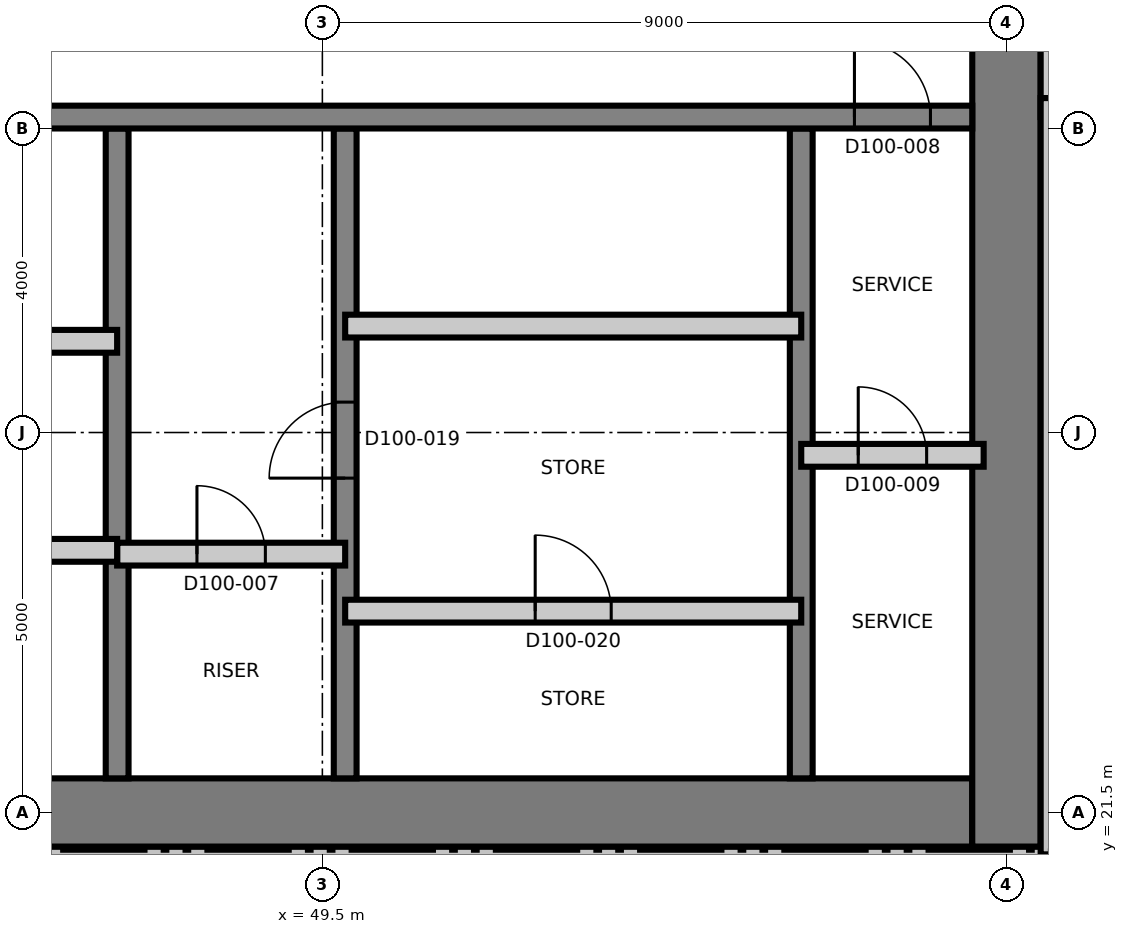
"""IFC4 building model, lengths in metres.
Left out: names, types, materials, properties, quantities, classifications, styles, units other than length and angle.
Written with IfcOpenShell. Run it as: python <this file> out.ifc"""

import sys

from ifc_helpers import new_model, si_unit, direction, frame, frame_2d, origin, place, context, subcontext, project, spatial, rectangle, extrude, element, fill, save


model = new_model("IFC4")
c1 = context("Model", 3, precision=1e-05, world=origin(), true_north=direction((0.0, 1.0)))
c2 = subcontext(c1, "Body", "Model", "MODEL_VIEW")
j1 = project(units=[si_unit("LENGTHUNIT", "METRE"), si_unit("PLANEANGLEUNIT", "RADIAN")], contexts=[c1])
p1 = place(None, origin())
s1 = spatial("IfcSite", under=j1, at=p1, CompositionType="ELEMENT")
p2 = place(p1, origin())
s2 = spatial("IfcBuilding", under=s1, at=p2, CompositionType="ELEMENT")
p3 = place(p2, frame((0.0, 0.0, -9.0)))
s3 = spatial("IfcBuildingStorey", under=s2, at=p3, CompositionType="ELEMENT", Elevation=-9.0)
p4 = place(p3, frame((31.05, 21.5, 0.0), z_axis=(0.0, 0.0, 1.0), x_axis=(1.0, 0.0, 0.0)))
e1 = element("IfcWall", 1, at=p4, inside=s3, PredefinedType="SHEAR", context=c2, shape_type="SweptSolid", body=[
    extrude(rectangle(XDim=27.0, YDim=0.9, at=frame_2d((13.5, 0.0))), origin(), (0.0, 0.0, 1.0), 4.5),
])
p5 = place(p3, frame((58.5, 21.05, 0.0), z_axis=(0.0, 0.0, 1.0), x_axis=(0.0, 1.0, 0.0)))
e2 = element("IfcWall", 2, at=p5, inside=s3, PredefinedType="SHEAR", context=c2, shape_type="SweptSolid", body=[
    extrude(rectangle(XDim=18.9, YDim=0.9, at=frame_2d((9.45, 0.0))), origin(), (0.0, 0.0, 1.0), 4.5),
])
p6 = place(p3, frame((46.8, 21.95, 0.0), z_axis=(0.0, 0.0, 1.0), x_axis=(0.0, 1.0, 0.0)))
e3 = element("IfcWall", 3, at=p6, inside=s3, PredefinedType="SHEAR", context=c2, shape_type="SweptSolid", body=[
    extrude(rectangle(XDim=8.55, YDim=0.3, at=frame_2d((4.275, 0.0))), origin(), (0.0, 0.0, 1.0), 4.5),
])
p7 = place(p3, frame((49.8, 21.95, 0.0), z_axis=(0.0, 0.0, 1.0), x_axis=(0.0, 1.0, 0.0)))
e4 = element("IfcWall", 4, at=p7, inside=s3, PredefinedType="SHEAR", context=c2, shape_type="SweptSolid", body=[
    extrude(rectangle(XDim=8.55, YDim=0.3, at=frame_2d((4.275, 0.0))), origin(), (0.0, 0.0, 1.0), 4.5),
])
p8 = place(p7, frame((3.95, 0.0, 0.0)))
e5 = element("IfcOpeningElement", 5, at=p8, cuts=e4, PredefinedType="OPENING", context=c2, shape_type="SweptSolid", body=[
    extrude(rectangle(XDim=1.0, YDim=2.1, at=frame_2d((0.5, 1.05))), frame((0.0, 0.16, 0.0), z_axis=(0.0, -1.0, 0.0), x_axis=(1.0, 0.0, 0.0)), (0.0, 0.0, 1.0), 0.32),
])
p9 = place(p3, frame((55.8, 21.95, 0.0), z_axis=(0.0, 0.0, 1.0), x_axis=(0.0, 1.0, 0.0)))
e6 = element("IfcWall", 6, at=p9, inside=s3, PredefinedType="SHEAR", context=c2, shape_type="SweptSolid", body=[
    extrude(rectangle(XDim=8.55, YDim=0.3, at=frame_2d((4.275, 0.0))), origin(), (0.0, 0.0, 1.0), 4.5),
])
p10 = place(p3, frame((31.95, 30.65, 0.0), z_axis=(0.0, 0.0, 1.0), x_axis=(1.0, 0.0, 0.0)))
e7 = element("IfcWall", 7, at=p10, inside=s3, PredefinedType="SHEAR", context=c2, shape_type="SweptSolid", body=[
    extrude(rectangle(XDim=26.1, YDim=0.3, at=frame_2d((13.05, 0.0))), origin(), (0.0, 0.0, 1.0), 4.5),
])
p11 = place(p10, frame((24.55, 0.0, 0.0)))
e8 = element("IfcOpeningElement", 8, at=p11, cuts=e7, PredefinedType="OPENING", context=c2, shape_type="SweptSolid", body=[
    extrude(rectangle(XDim=1.0, YDim=2.1, at=frame_2d((0.5, 1.05))), frame((0.0, 0.16, 0.0), z_axis=(0.0, -1.0, 0.0), x_axis=(1.0, 0.0, 0.0)), (0.0, 0.0, 1.0), 0.32),
])
p12 = place(p10, frame((3.85, 0.0, 0.0)))
e9 = element("IfcOpeningElement", 9, at=p12, cuts=e7, PredefinedType="OPENING", context=c2, shape_type="SweptSolid", body=[
    extrude(rectangle(XDim=1.0, YDim=2.1, at=frame_2d((0.5, 1.05))), frame((0.0, 0.16, 0.0), z_axis=(0.0, -1.0, 0.0), x_axis=(1.0, 0.0, 0.0)), (0.0, 0.0, 1.0), 0.32),
])
p13 = place(p10, frame((11.35, 0.0, 0.0)))
e10 = element("IfcOpeningElement", 10, at=p13, cuts=e7, PredefinedType="OPENING", context=c2, shape_type="SweptSolid", body=[
    extrude(rectangle(XDim=1.0, YDim=2.1, at=frame_2d((0.5, 1.05))), frame((0.0, 0.16, 0.0), z_axis=(0.0, -1.0, 0.0), x_axis=(1.0, 0.0, 0.0)), (0.0, 0.0, 1.0), 0.32),
])
p14 = place(p3, frame((49.8, 24.15, 0.0), z_axis=(0.0, 0.0, 1.0), x_axis=(1.0, 0.0, 0.0)))
e11 = element("IfcWall", 11, at=p14, inside=s3, PredefinedType="PARTITIONING", context=c2, shape_type="SweptSolid", body=[
    extrude(rectangle(XDim=6.0, YDim=0.3, at=frame_2d((3.0, 0.0))), origin(), (0.0, 0.0, 1.0), 4.2),
])
p15 = place(p14, frame((2.5, 0.0, 0.0)))
e12 = element("IfcOpeningElement", 12, at=p15, cuts=e11, PredefinedType="OPENING", context=c2, shape_type="SweptSolid", body=[
    extrude(rectangle(XDim=1.0, YDim=2.1, at=frame_2d((0.5, 1.05))), frame((0.0, 0.16, 0.0), z_axis=(0.0, -1.0, 0.0), x_axis=(1.0, 0.0, 0.0)), (0.0, 0.0, 1.0), 0.32),
])
p16 = place(p3, frame((46.8, 24.9, 0.0), z_axis=(0.0, 0.0, 1.0), x_axis=(1.0, 0.0, 0.0)))
e13 = element("IfcWall", 13, at=p16, inside=s3, PredefinedType="PARTITIONING", context=c2, shape_type="SweptSolid", body=[
    extrude(rectangle(XDim=3.0, YDim=0.3, at=frame_2d((1.5, 0.0))), origin(), (0.0, 0.0, 1.0), 4.2),
])
p17 = place(p16, frame((1.05, 0.0, 0.0)))
e14 = element("IfcOpeningElement", 14, at=p17, cuts=e13, PredefinedType="OPENING", context=c2, shape_type="SweptSolid", body=[
    extrude(rectangle(XDim=0.9, YDim=2.1, at=frame_2d((0.45, 1.05))), frame((0.0, 0.16, 0.0), z_axis=(0.0, -1.0, 0.0), x_axis=(1.0, 0.0, 0.0)), (0.0, 0.0, 1.0), 0.32),
])
p18 = place(p3, frame((40.8, 24.95, 0.0), z_axis=(0.0, 0.0, 1.0), x_axis=(1.0, 0.0, 0.0)))
e15 = element("IfcWall", 15, at=p18, inside=s3, PredefinedType="PARTITIONING", context=c2, shape_type="SweptSolid", body=[
    extrude(rectangle(XDim=6.0, YDim=0.3, at=frame_2d((3.0, 0.0))), origin(), (0.0, 0.0, 1.0), 4.2),
])
p19 = place(p18, frame((2.5, 0.0, 0.0)))
e16 = element("IfcOpeningElement", 16, at=p19, cuts=e15, PredefinedType="OPENING", context=c2, shape_type="SweptSolid", body=[
    extrude(rectangle(XDim=1.0, YDim=2.1, at=frame_2d((0.5, 1.05))), frame((0.0, 0.16, 0.0), z_axis=(0.0, -1.0, 0.0), x_axis=(1.0, 0.0, 0.0)), (0.0, 0.0, 1.0), 0.32),
])
p20 = place(p3, frame((55.8, 26.2, 0.0), z_axis=(0.0, 0.0, 1.0), x_axis=(1.0, 0.0, 0.0)))
e17 = element("IfcWall", 17, at=p20, inside=s3, PredefinedType="PARTITIONING", context=c2, shape_type="SweptSolid", body=[
    extrude(rectangle(XDim=2.4, YDim=0.3, at=frame_2d((1.2, 0.0))), origin(), (0.0, 0.0, 1.0), 4.2),
])
p21 = place(p20, frame((0.75, 0.0, 0.0)))
e18 = element("IfcOpeningElement", 18, at=p21, cuts=e17, PredefinedType="OPENING", context=c2, shape_type="SweptSolid", body=[
    extrude(rectangle(XDim=0.9, YDim=2.1, at=frame_2d((0.45, 1.05))), frame((0.0, 0.16, 0.0), z_axis=(0.0, -1.0, 0.0), x_axis=(1.0, 0.0, 0.0)), (0.0, 0.0, 1.0), 0.32),
])
for number, where, z_axis, x_axis in (
    (19, (40.8, 27.7, 0.0), (0.0, 0.0, 1.0), (1.0, 0.0, 0.0)),
    (20, (49.8, 27.9, 0.0), (0.0, 0.0, 1.0), (1.0, 0.0, 0.0)),
):
    element("IfcWall", number, at=place(p3, frame(where, z_axis=z_axis, x_axis=x_axis)), inside=s3, PredefinedType="PARTITIONING", context=c2, shape_type="SweptSolid", body=[
        extrude(rectangle(XDim=6.0, YDim=0.3, at=frame_2d((3.0, 0.0))), origin(), (0.0, 0.0, 1.0), 4.2),
    ])
p22 = place(p3, frame((59.1, 30.65, 0.0), z_axis=(0.0, 0.0, 1.0), x_axis=(0.0, 1.0, 0.0)))
e21 = element("IfcWall", 21, at=p22, inside=s3, PredefinedType="PARTITIONING", context=c2, shape_type="SweptSolid", body=[
    extrude(rectangle(XDim=2.7, YDim=0.3, at=frame_2d((1.35, 0.0))), origin(), (0.0, 0.0, 1.0), 4.2),
])
p23 = place(p3, frame((31.15, 20.95, 0.0), z_axis=(0.0, 0.0, 1.0), x_axis=(1.0, 0.0, 0.0)))
e22 = element("IfcWall", 22, at=p23, inside=s3, PredefinedType="PARTITIONING", context=c2, shape_type="SweptSolid", body=[
    extrude(rectangle(XDim=27.9, YDim=0.2, at=frame_2d((13.95, 0.0))), origin(), (0.0, 0.0, 1.0), 4.2),
])
p24 = place(p3, frame((59.05, 20.95, 0.0), z_axis=(0.0, 0.0, 1.0), x_axis=(0.0, 1.0, 0.0)))
e23 = element("IfcWall", 23, at=p24, inside=s3, PredefinedType="PARTITIONING", context=c2, shape_type="SweptSolid", body=[
    extrude(rectangle(XDim=9.95, YDim=0.2, at=frame_2d((4.975, 0.0))), origin(), (0.0, 0.0, 1.0), 4.2),
])
p25 = place(p17, origin())
e24 = element("IfcDoor", 24, at=p25, inside=s3, OperationType="SINGLE_SWING_RIGHT", PredefinedType="DOOR", context=c2, shape_type="SweptSolid", body=[
    extrude(rectangle(XDim=0.9, YDim=2.1, at=frame_2d((0.45, 1.05))), frame((0.0, 0.025, 0.0), z_axis=(0.0, -1.0, 0.0), x_axis=(1.0, 0.0, 0.0)), (0.0, 0.0, 1.0), 0.05),
])
fill(e14, e24)
p26 = place(p11, origin())
e25 = element("IfcDoor", 25, at=p26, inside=s3, OperationType="SINGLE_SWING_LEFT", PredefinedType="DOOR", context=c2, shape_type="SweptSolid", body=[
    extrude(rectangle(XDim=1.0, YDim=2.1, at=frame_2d((0.5, 1.05))), frame((0.0, 0.025, 0.0), z_axis=(0.0, -1.0, 0.0), x_axis=(1.0, 0.0, 0.0)), (0.0, 0.0, 1.0), 0.05),
])
fill(e8, e25)
p27 = place(p21, origin())
e26 = element("IfcDoor", 26, at=p27, inside=s3, OperationType="SINGLE_SWING_RIGHT", PredefinedType="DOOR", context=c2, shape_type="SweptSolid", body=[
    extrude(rectangle(XDim=0.9, YDim=2.1, at=frame_2d((0.45, 1.05))), frame((0.0, 0.025, 0.0), z_axis=(0.0, -1.0, 0.0), x_axis=(1.0, 0.0, 0.0)), (0.0, 0.0, 1.0), 0.05),
])
fill(e18, e26)
p28 = place(p8, origin())
e27 = element("IfcDoor", 27, at=p28, inside=s3, OperationType="SINGLE_SWING_RIGHT", PredefinedType="DOOR", context=c2, shape_type="SweptSolid", body=[
    extrude(rectangle(XDim=1.0, YDim=2.1, at=frame_2d((0.5, 1.05))), frame((0.0, 0.025, 0.0), z_axis=(0.0, -1.0, 0.0), x_axis=(1.0, 0.0, 0.0)), (0.0, 0.0, 1.0), 0.05),
])
fill(e5, e27)
p29 = place(p15, origin())
e28 = element("IfcDoor", 28, at=p29, inside=s3, OperationType="SINGLE_SWING_RIGHT", PredefinedType="DOOR", context=c2, shape_type="SweptSolid", body=[
    extrude(rectangle(XDim=1.0, YDim=2.1, at=frame_2d((0.5, 1.05))), frame((0.0, 0.025, 0.0), z_axis=(0.0, -1.0, 0.0), x_axis=(1.0, 0.0, 0.0)), (0.0, 0.0, 1.0), 0.05),
])
fill(e12, e28)
save(model, sys.argv[1])
